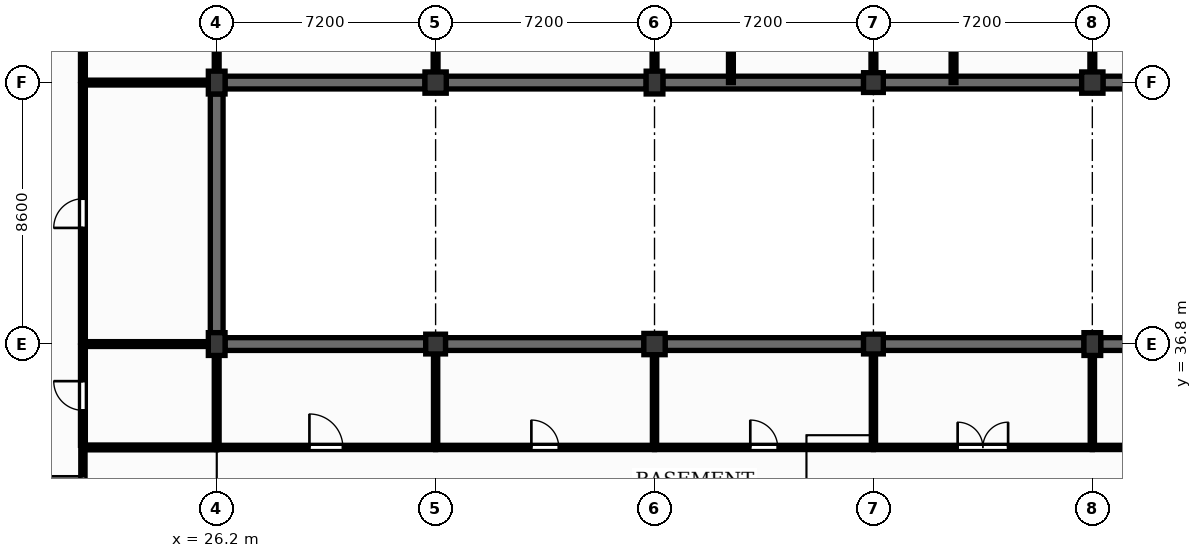
"""IFC4 building model, lengths in metres.
Left out: names, types, materials, properties, quantities, classifications, styles, units other than length and angle.
Written with IfcOpenShell. Run it as: python <this file> out.ifc"""

import sys

from ifc_helpers import new_model, si_unit, direction, frame, frame_2d, origin, origin_2d, place, context, subcontext, project, spatial, rectangle, extrude, element, fill, save


model = new_model("IFC4")
c1 = context("Model", 3, precision=1e-05, world=origin(), true_north=direction((0.0, 1.0)))
c2 = subcontext(c1, "Body", "Model", "MODEL_VIEW")
j1 = project(units=[si_unit("LENGTHUNIT", "METRE"), si_unit("PLANEANGLEUNIT", "RADIAN")], contexts=[c1])
p1 = place(None, origin())
s1 = spatial("IfcSite", under=j1, at=p1, CompositionType="ELEMENT")
p2 = place(p1, origin())
s2 = spatial("IfcBuilding", under=s1, at=p2, CompositionType="ELEMENT")
p3 = place(p2, frame((0.0, 0.0, -4.5)))
s3 = spatial("IfcBuildingStorey", under=s2, at=p3, CompositionType="ELEMENT", Elevation=-4.5)
for number, where, z_axis, x_axis in (
    (1, (26.2, 36.8, 0.0), (0.0, 0.0, 1.0), (1.0, 0.0, 0.0)),
    (2, (26.2, 45.4, 0.0), (0.0, 0.0, 1.0), (1.0, 0.0, 0.0)),
):
    element("IfcColumn", number, at=place(p3, frame(where, z_axis=z_axis, x_axis=x_axis)), inside=s3, PredefinedType="COLUMN", context=c2, shape_type="SweptSolid", body=[
        extrude(rectangle(XDim=0.55, YDim=0.75, at=origin_2d()), origin(), (0.0, 0.0, 1.0), 4.2),
    ])
p4 = place(p3, frame((33.4, 36.8, 0.0), z_axis=(0.0, 0.0, 1.0), x_axis=(1.0, 0.0, 0.0)))
e3 = element("IfcColumn", 3, at=p4, inside=s3, PredefinedType="COLUMN", context=c2, shape_type="SweptSolid", body=[
    extrude(rectangle(XDim=0.65, YDim=0.65, at=origin_2d()), origin(), (0.0, 0.0, 1.0), 4.2),
])
for number, where, z_axis, x_axis in (
    (4, (33.4, 45.4, 0.0), (0.0, 0.0, 1.0), (1.0, 0.0, 0.0)),
    (5, (40.6, 36.8, 0.0), (0.0, 0.0, 1.0), (1.0, 0.0, 0.0)),
):
    element("IfcColumn", number, at=place(p3, frame(where, z_axis=z_axis, x_axis=x_axis)), inside=s3, PredefinedType="COLUMN", context=c2, shape_type="SweptSolid", body=[
        extrude(rectangle(XDim=0.7, YDim=0.7, at=origin_2d()), origin(), (0.0, 0.0, 1.0), 4.2),
    ])
p5 = place(p3, frame((40.6, 45.4, 0.0), z_axis=(0.0, 0.0, 1.0), x_axis=(1.0, 0.0, 0.0)))
e6 = element("IfcColumn", 6, at=p5, inside=s3, PredefinedType="COLUMN", context=c2, shape_type="SweptSolid", body=[
    extrude(rectangle(XDim=0.55, YDim=0.75, at=origin_2d()), origin(), (0.0, 0.0, 1.0), 4.2),
])
for number, where, z_axis, x_axis in (
    (7, (47.8, 36.8, 0.0), (0.0, 0.0, 1.0), (1.0, 0.0, 0.0)),
    (8, (47.8, 45.4, 0.0), (0.0, 0.0, 1.0), (1.0, 0.0, 0.0)),
):
    element("IfcColumn", number, at=place(p3, frame(where, z_axis=z_axis, x_axis=x_axis)), inside=s3, PredefinedType="COLUMN", context=c2, shape_type="SweptSolid", body=[
        extrude(rectangle(XDim=0.65, YDim=0.65, at=origin_2d()), origin(), (0.0, 0.0, 1.0), 4.2),
    ])
p6 = place(p3, frame((55.0, 36.8, 0.0), z_axis=(0.0, 0.0, 1.0), x_axis=(1.0, 0.0, 0.0)))
e9 = element("IfcColumn", 9, at=p6, inside=s3, PredefinedType="COLUMN", context=c2, shape_type="SweptSolid", body=[
    extrude(rectangle(XDim=0.55, YDim=0.75, at=origin_2d()), origin(), (0.0, 0.0, 1.0), 4.2),
])
p7 = place(p3, frame((55.0, 45.4, 0.0), z_axis=(0.0, 0.0, 1.0), x_axis=(1.0, 0.0, 0.0)))
e10 = element("IfcColumn", 10, at=p7, inside=s3, PredefinedType="COLUMN", context=c2, shape_type="SweptSolid", body=[
    extrude(rectangle(XDim=0.7, YDim=0.7, at=origin_2d()), origin(), (0.0, 0.0, 1.0), 4.2),
])
p8 = place(p3, frame((26.2, 37.175, 0.0), z_axis=(0.0, 0.0, 1.0), x_axis=(0.0, 1.0, 0.0)))
e11 = element("IfcWall", 11, at=p8, inside=s3, PredefinedType="USERDEFINED", context=c2, shape_type="SweptSolid", body=[
    extrude(rectangle(XDim=7.85, YDim=0.42, at=frame_2d((3.925, 0.0))), origin(), (0.0, 0.0, 1.0), 4.2),
])
p9 = place(p3, frame((26.475, 36.8, 0.0), z_axis=(0.0, 0.0, 1.0), x_axis=(1.0, 0.0, 0.0)))
e12 = element("IfcWall", 12, at=p9, inside=s3, PredefinedType="USERDEFINED", context=c2, shape_type="SweptSolid", body=[
    extrude(rectangle(XDim=6.6, YDim=0.42, at=frame_2d((3.3, 0.0))), origin(), (0.0, 0.0, 1.0), 4.2),
])
p10 = place(p3, frame((26.475, 45.4, 0.0), z_axis=(0.0, 0.0, 1.0), x_axis=(1.0, 0.0, 0.0)))
e13 = element("IfcWall", 13, at=p10, inside=s3, PredefinedType="USERDEFINED", context=c2, shape_type="SweptSolid", body=[
    extrude(rectangle(XDim=6.575, YDim=0.42, at=frame_2d((3.288, 0.0))), origin(), (0.0, 0.0, 1.0), 4.2),
])
p11 = place(p3, frame((33.725, 36.8, 0.0), z_axis=(0.0, 0.0, 1.0), x_axis=(1.0, 0.0, 0.0)))
e14 = element("IfcWall", 14, at=p11, inside=s3, PredefinedType="USERDEFINED", context=c2, shape_type="SweptSolid", body=[
    extrude(rectangle(XDim=6.525, YDim=0.42, at=frame_2d((3.262, 0.0))), origin(), (0.0, 0.0, 1.0), 4.2),
])
p12 = place(p3, frame((33.75, 45.4, 0.0), z_axis=(0.0, 0.0, 1.0), x_axis=(1.0, 0.0, 0.0)))
e15 = element("IfcWall", 15, at=p12, inside=s3, PredefinedType="USERDEFINED", context=c2, shape_type="SweptSolid", body=[
    extrude(rectangle(XDim=6.575, YDim=0.42, at=frame_2d((3.288, 0.0))), origin(), (0.0, 0.0, 1.0), 4.2),
])
p13 = place(p3, frame((40.95, 36.8, 0.0), z_axis=(0.0, 0.0, 1.0), x_axis=(1.0, 0.0, 0.0)))
e16 = element("IfcWall", 16, at=p13, inside=s3, PredefinedType="USERDEFINED", context=c2, shape_type="SweptSolid", body=[
    extrude(rectangle(XDim=6.525, YDim=0.42, at=frame_2d((3.263, 0.0))), origin(), (0.0, 0.0, 1.0), 4.2),
])
for number, where, z_axis, x_axis in (
    (17, (40.875, 45.4, 0.0), (0.0, 0.0, 1.0), (1.0, 0.0, 0.0)),
    (18, (48.125, 36.8, 0.0), (0.0, 0.0, 1.0), (1.0, 0.0, 0.0)),
):
    element("IfcWall", number, at=place(p3, frame(where, z_axis=z_axis, x_axis=x_axis)), inside=s3, PredefinedType="USERDEFINED", context=c2, shape_type="SweptSolid", body=[
        extrude(rectangle(XDim=6.6, YDim=0.42, at=frame_2d((3.3, 0.0))), origin(), (0.0, 0.0, 1.0), 4.2),
    ])
p14 = place(p3, frame((48.125, 45.4, 0.0), z_axis=(0.0, 0.0, 1.0), x_axis=(1.0, 0.0, 0.0)))
e19 = element("IfcWall", 19, at=p14, inside=s3, PredefinedType="USERDEFINED", context=c2, shape_type="SweptSolid", body=[
    extrude(rectangle(XDim=6.525, YDim=0.42, at=frame_2d((3.262, 0.0))), origin(), (0.0, 0.0, 1.0), 4.2),
])
p15 = place(p3, frame((55.275, 36.8, 0.0), z_axis=(0.0, 0.0, 1.0), x_axis=(1.0, 0.0, 0.0)))
e20 = element("IfcWall", 20, at=p15, inside=s3, PredefinedType="USERDEFINED", context=c2, shape_type="SweptSolid", body=[
    extrude(rectangle(XDim=6.575, YDim=0.42, at=frame_2d((3.288, 0.0))), origin(), (0.0, 0.0, 1.0), 4.2),
])
p16 = place(p3, frame((55.35, 45.4, 0.0), z_axis=(0.0, 0.0, 1.0), x_axis=(1.0, 0.0, 0.0)))
e21 = element("IfcWall", 21, at=p16, inside=s3, PredefinedType="USERDEFINED", context=c2, shape_type="SweptSolid", body=[
    extrude(rectangle(XDim=6.525, YDim=0.42, at=frame_2d((3.262, 0.0))), origin(), (0.0, 0.0, 1.0), 4.2),
])
p17 = place(p3, frame((21.8, 30.47, 0.0), z_axis=(0.0, 0.0, 1.0), x_axis=(0.0, 1.0, 0.0)))
e22 = element("IfcWall", 22, at=p17, inside=s3, PredefinedType="PARTITIONING", context=c2, shape_type="SweptSolid", body=[
    extrude(rectangle(XDim=2.86, YDim=0.14, at=frame_2d((1.43, 0.0))), origin(), (0.0, 0.0, 1.0), 4.08),
])
p18 = place(p17, frame((0.88, 0.0, 0.0)))
e23 = element("IfcOpeningElement", 23, at=p18, cuts=e22, PredefinedType="OPENING", context=c2, shape_type="SweptSolid", body=[
    extrude(rectangle(XDim=1.1, YDim=2.1, at=frame_2d((0.55, 1.05))), frame((0.0, 0.08, 0.0), z_axis=(0.0, -1.0, 0.0), x_axis=(1.0, 0.0, 0.0)), (0.0, 0.0, 1.0), 0.16),
])
p19 = place(p3, frame((21.8, 33.47, 0.0), z_axis=(0.0, 0.0, 1.0), x_axis=(0.0, 1.0, 0.0)))
e24 = element("IfcWall", 24, at=p19, inside=s3, PredefinedType="PARTITIONING", context=c2, shape_type="SweptSolid", body=[
    extrude(rectangle(XDim=3.26, YDim=0.16, at=frame_2d((1.63, 0.0))), origin(), (0.0, 0.0, 1.0), 4.08),
])
p20 = place(p19, frame((1.15, 0.0, 0.0)))
e25 = element("IfcOpeningElement", 25, at=p20, cuts=e24, PredefinedType="OPENING", context=c2, shape_type="SweptSolid", body=[
    extrude(rectangle(XDim=0.96, YDim=2.1, at=frame_2d((0.48, 1.05))), frame((0.0, 0.09, 0.0), z_axis=(0.0, -1.0, 0.0), x_axis=(1.0, 0.0, 0.0)), (0.0, 0.0, 1.0), 0.18),
])
p21 = place(p3, frame((21.8, 33.4, 0.0), z_axis=(0.0, 0.0, 1.0), x_axis=(1.0, 0.0, 0.0)))
e26 = element("IfcWall", 26, at=p21, inside=s3, PredefinedType="PARTITIONING", context=c2, shape_type="SweptSolid", body=[
    extrude(rectangle(XDim=4.4, YDim=0.16, at=frame_2d((2.2, 0.0))), origin(), (0.0, 0.0, 1.0), 4.08),
])
p22 = place(p3, frame((21.8, 36.87, 0.0), z_axis=(0.0, 0.0, 1.0), x_axis=(0.0, 1.0, 0.0)))
e27 = element("IfcWall", 27, at=p22, inside=s3, PredefinedType="PARTITIONING", context=c2, shape_type="SweptSolid", body=[
    extrude(rectangle(XDim=8.46, YDim=0.16, at=frame_2d((4.23, 0.0))), origin(), (0.0, 0.0, 1.0), 4.08),
])
p23 = place(p22, frame((3.75, 0.0, 0.0)))
e28 = element("IfcOpeningElement", 28, at=p23, cuts=e27, PredefinedType="OPENING", context=c2, shape_type="SweptSolid", body=[
    extrude(rectangle(XDim=0.96, YDim=2.1, at=frame_2d((0.48, 1.05))), frame((0.0, 0.09, 0.0), z_axis=(0.0, -1.0, 0.0), x_axis=(1.0, 0.0, 0.0)), (0.0, 0.0, 1.0), 0.18),
])
p24 = place(p3, frame((21.8, 36.8, 0.0), z_axis=(0.0, 0.0, 1.0), x_axis=(1.0, 0.0, 0.0)))
e29 = element("IfcWall", 29, at=p24, inside=s3, PredefinedType="PARTITIONING", context=c2, shape_type="SweptSolid", body=[
    extrude(rectangle(XDim=4.125, YDim=0.16, at=frame_2d((2.062, 0.0))), origin(), (0.0, 0.0, 1.0), 3.5),
])
p25 = place(p3, frame((21.8, 45.47, 0.0), z_axis=(0.0, 0.0, 1.0), x_axis=(0.0, 1.0, 0.0)))
e30 = element("IfcWall", 30, at=p25, inside=s3, PredefinedType="PARTITIONING", context=c2, shape_type="SweptSolid", body=[
    extrude(rectangle(XDim=5.06, YDim=0.16, at=frame_2d((2.53, 0.0))), origin(), (0.0, 0.0, 1.0), 4.08),
])
p26 = place(p25, frame((2.05, 0.0, 0.0)))
e31 = element("IfcOpeningElement", 31, at=p26, cuts=e30, PredefinedType="OPENING", context=c2, shape_type="SweptSolid", body=[
    extrude(rectangle(XDim=0.96, YDim=2.1, at=frame_2d((0.48, 1.05))), frame((0.0, 0.09, 0.0), z_axis=(0.0, -1.0, 0.0), x_axis=(1.0, 0.0, 0.0)), (0.0, 0.0, 1.0), 0.18),
])
p27 = place(p3, frame((21.8, 45.4, 0.0), z_axis=(0.0, 0.0, 1.0), x_axis=(1.0, 0.0, 0.0)))
e32 = element("IfcWall", 32, at=p27, inside=s3, PredefinedType="PARTITIONING", context=c2, shape_type="SweptSolid", body=[
    extrude(rectangle(XDim=4.125, YDim=0.16, at=frame_2d((2.062, 0.0))), origin(), (0.0, 0.0, 1.0), 3.6),
])
p28 = place(p3, frame((26.2, 33.47, 0.0), z_axis=(0.0, 0.0, 1.0), x_axis=(0.0, 1.0, 0.0)))
e33 = element("IfcWall", 33, at=p28, inside=s3, PredefinedType="PARTITIONING", context=c2, shape_type="SweptSolid", body=[
    extrude(rectangle(XDim=2.955, YDim=0.16, at=frame_2d((1.478, 0.0))), origin(), (0.0, 0.0, 1.0), 3.4),
])
p29 = place(p3, frame((26.2, 33.4, 0.0), z_axis=(0.0, 0.0, 1.0), x_axis=(1.0, 0.0, 0.0)))
e34 = element("IfcWall", 34, at=p29, inside=s3, PredefinedType="PARTITIONING", context=c2, shape_type="SweptSolid", body=[
    extrude(rectangle(XDim=7.2, YDim=0.14, at=frame_2d((3.6, 0.0))), origin(), (0.0, 0.0, 1.0), 4.08),
])
p30 = place(p29, frame((3.05, 0.0, 0.0)))
e35 = element("IfcOpeningElement", 35, at=p30, cuts=e34, PredefinedType="OPENING", context=c2, shape_type="SweptSolid", body=[
    extrude(rectangle(XDim=1.1, YDim=2.1, at=frame_2d((0.55, 1.05))), frame((0.0, 0.08, 0.0), z_axis=(0.0, -1.0, 0.0), x_axis=(1.0, 0.0, 0.0)), (0.0, 0.0, 1.0), 0.16),
])
p31 = place(p3, frame((26.2, 45.775, 0.0), z_axis=(0.0, 0.0, 1.0), x_axis=(0.0, 1.0, 0.0)))
e36 = element("IfcWall", 36, at=p31, inside=s3, PredefinedType="PARTITIONING", context=c2, shape_type="SweptSolid", body=[
    extrude(rectangle(XDim=4.755, YDim=0.16, at=frame_2d((2.377, 0.0))), origin(), (0.0, 0.0, 1.0), 3.5),
])
p32 = place(p3, frame((33.4, 33.47, 0.0), z_axis=(0.0, 0.0, 1.0), x_axis=(0.0, 1.0, 0.0)))
e37 = element("IfcWall", 37, at=p32, inside=s3, PredefinedType="PARTITIONING", context=c2, shape_type="SweptSolid", body=[
    extrude(rectangle(XDim=3.005, YDim=0.14, at=frame_2d((1.502, 0.0))), origin(), (0.0, 0.0, 1.0), 3.4),
])
p33 = place(p3, frame((33.4, 33.4, 0.0), z_axis=(0.0, 0.0, 1.0), x_axis=(1.0, 0.0, 0.0)))
e38 = element("IfcWall", 38, at=p33, inside=s3, PredefinedType="PARTITIONING", context=c2, shape_type="SweptSolid", body=[
    extrude(rectangle(XDim=7.2, YDim=0.14, at=frame_2d((3.6, 0.0))), origin(), (0.0, 0.0, 1.0), 4.08),
])
p34 = place(p33, frame((3.15, 0.0, 0.0)))
e39 = element("IfcOpeningElement", 39, at=p34, cuts=e38, PredefinedType="OPENING", context=c2, shape_type="SweptSolid", body=[
    extrude(rectangle(XDim=0.9, YDim=2.1, at=frame_2d((0.45, 1.05))), frame((0.0, 0.08, 0.0), z_axis=(0.0, -1.0, 0.0), x_axis=(1.0, 0.0, 0.0)), (0.0, 0.0, 1.0), 0.16),
])
p35 = place(p3, frame((33.4, 45.75, 0.0), z_axis=(0.0, 0.0, 1.0), x_axis=(0.0, 1.0, 0.0)))
e40 = element("IfcWall", 40, at=p35, inside=s3, PredefinedType="PARTITIONING", context=c2, shape_type="SweptSolid", body=[
    extrude(rectangle(XDim=4.78, YDim=0.16, at=frame_2d((2.39, 0.0))), origin(), (0.0, 0.0, 1.0), 3.5),
])
p36 = place(p3, frame((40.6, 33.47, 0.0), z_axis=(0.0, 0.0, 1.0), x_axis=(0.0, 1.0, 0.0)))
e41 = element("IfcWall", 41, at=p36, inside=s3, PredefinedType="PARTITIONING", context=c2, shape_type="SweptSolid", body=[
    extrude(rectangle(XDim=2.98, YDim=0.14, at=frame_2d((1.49, 0.0))), origin(), (0.0, 0.0, 1.0), 3.4),
])
p37 = place(p3, frame((40.6, 33.4, 0.0), z_axis=(0.0, 0.0, 1.0), x_axis=(1.0, 0.0, 0.0)))
e42 = element("IfcWall", 42, at=p37, inside=s3, PredefinedType="PARTITIONING", context=c2, shape_type="SweptSolid", body=[
    extrude(rectangle(XDim=7.2, YDim=0.14, at=frame_2d((3.6, 0.0))), origin(), (0.0, 0.0, 1.0), 4.08),
])
p38 = place(p37, frame((3.15, 0.0, 0.0)))
e43 = element("IfcOpeningElement", 43, at=p38, cuts=e42, PredefinedType="OPENING", context=c2, shape_type="SweptSolid", body=[
    extrude(rectangle(XDim=0.9, YDim=2.1, at=frame_2d((0.45, 1.05))), frame((0.0, 0.08, 0.0), z_axis=(0.0, -1.0, 0.0), x_axis=(1.0, 0.0, 0.0)), (0.0, 0.0, 1.0), 0.16),
])
p39 = place(p3, frame((40.6, 45.775, 0.0), z_axis=(0.0, 0.0, 1.0), x_axis=(0.0, 1.0, 0.0)))
e44 = element("IfcWall", 44, at=p39, inside=s3, PredefinedType="PARTITIONING", context=c2, shape_type="SweptSolid", body=[
    extrude(rectangle(XDim=4.755, YDim=0.16, at=frame_2d((2.377, 0.0))), origin(), (0.0, 0.0, 1.0), 3.5),
])
p40 = place(p3, frame((43.113, 45.4, 0.0), z_axis=(0.0, 0.0, 1.0), x_axis=(0.0, 1.0, 0.0)))
e45 = element("IfcWall", 45, at=p40, inside=s3, PredefinedType="PARTITIONING", context=c2, shape_type="SweptSolid", body=[
    extrude(rectangle(XDim=5.13, YDim=0.16, at=frame_2d((2.565, 0.0))), origin(), (0.0, 0.0, 1.0), 4.08),
])
p41 = place(p3, frame((47.8, 33.47, 0.0), z_axis=(0.0, 0.0, 1.0), x_axis=(0.0, 1.0, 0.0)))
e46 = element("IfcWall", 46, at=p41, inside=s3, PredefinedType="PARTITIONING", context=c2, shape_type="SweptSolid", body=[
    extrude(rectangle(XDim=3.005, YDim=0.14, at=frame_2d((1.502, 0.0))), origin(), (0.0, 0.0, 1.0), 3.4),
])
p42 = place(p3, frame((47.8, 33.4, 0.0), z_axis=(0.0, 0.0, 1.0), x_axis=(1.0, 0.0, 0.0)))
e47 = element("IfcWall", 47, at=p42, inside=s3, PredefinedType="PARTITIONING", context=c2, shape_type="SweptSolid", body=[
    extrude(rectangle(XDim=7.2, YDim=0.14, at=frame_2d((3.6, 0.0))), origin(), (0.0, 0.0, 1.0), 4.08),
])
p43 = place(p42, frame((2.77, 0.0, 0.0)))
e48 = element("IfcOpeningElement", 48, at=p43, cuts=e47, PredefinedType="OPENING", context=c2, shape_type="SweptSolid", body=[
    extrude(rectangle(XDim=1.66, YDim=2.3, at=frame_2d((0.83, 1.15))), frame((0.0, 0.08, 0.0), z_axis=(0.0, -1.0, 0.0), x_axis=(1.0, 0.0, 0.0)), (0.0, 0.0, 1.0), 0.16),
])
p44 = place(p3, frame((47.8, 45.725, 0.0), z_axis=(0.0, 0.0, 1.0), x_axis=(0.0, 1.0, 0.0)))
e49 = element("IfcWall", 49, at=p44, inside=s3, PredefinedType="PARTITIONING", context=c2, shape_type="SweptSolid", body=[
    extrude(rectangle(XDim=4.805, YDim=0.16, at=frame_2d((2.402, 0.0))), origin(), (0.0, 0.0, 1.0), 3.5),
])
p45 = place(p3, frame((50.435, 45.4, 0.0), z_axis=(0.0, 0.0, 1.0), x_axis=(0.0, 1.0, 0.0)))
e50 = element("IfcWall", 50, at=p45, inside=s3, PredefinedType="PARTITIONING", context=c2, shape_type="SweptSolid", body=[
    extrude(rectangle(XDim=5.13, YDim=0.16, at=frame_2d((2.565, 0.0))), origin(), (0.0, 0.0, 1.0), 4.08),
])
p46 = place(p3, frame((55.0, 33.47, 0.0), z_axis=(0.0, 0.0, 1.0), x_axis=(0.0, 1.0, 0.0)))
e51 = element("IfcWall", 51, at=p46, inside=s3, PredefinedType="PARTITIONING", context=c2, shape_type="SweptSolid", body=[
    extrude(rectangle(XDim=2.955, YDim=0.14, at=frame_2d((1.478, 0.0))), origin(), (0.0, 0.0, 1.0), 3.4),
])
p47 = place(p3, frame((55.0, 33.4, 0.0), z_axis=(0.0, 0.0, 1.0), x_axis=(1.0, 0.0, 0.0)))
e52 = element("IfcWall", 52, at=p47, inside=s3, PredefinedType="PARTITIONING", context=c2, shape_type="SweptSolid", body=[
    extrude(rectangle(XDim=7.05, YDim=0.14, at=frame_2d((3.525, 0.0))), origin(), (0.0, 0.0, 1.0), 4.08),
])
p48 = place(p47, frame((2.885, 0.0, 0.0)))
e53 = element("IfcOpeningElement", 53, at=p48, cuts=e52, PredefinedType="OPENING", context=c2, shape_type="SweptSolid", body=[
    extrude(rectangle(XDim=1.28, YDim=2.2, at=frame_2d((0.64, 1.1))), frame((0.0, 0.08, 0.0), z_axis=(0.0, -1.0, 0.0), x_axis=(1.0, 0.0, 0.0)), (0.0, 0.0, 1.0), 0.16),
])
p49 = place(p3, frame((55.0, 45.75, 0.0), z_axis=(0.0, 0.0, 1.0), x_axis=(0.0, 1.0, 0.0)))
e54 = element("IfcWall", 54, at=p49, inside=s3, PredefinedType="PARTITIONING", context=c2, shape_type="SweptSolid", body=[
    extrude(rectangle(XDim=4.78, YDim=0.16, at=frame_2d((2.39, 0.0))), origin(), (0.0, 0.0, 1.0), 3.5),
])
p50 = place(p18, origin())
e55 = element("IfcDoor", 55, at=p50, inside=s3, OperationType="SINGLE_SWING_RIGHT", PredefinedType="DOOR", context=c2, shape_type="SweptSolid", body=[
    extrude(rectangle(XDim=1.1, YDim=2.1, at=frame_2d((0.55, 1.05))), frame((0.0, 0.025, 0.0), z_axis=(0.0, -1.0, 0.0), x_axis=(1.0, 0.0, 0.0)), (0.0, 0.0, 1.0), 0.05),
])
fill(e23, e55)
p51 = place(p30, origin())
e56 = element("IfcDoor", 56, at=p51, inside=s3, OperationType="SINGLE_SWING_LEFT", PredefinedType="DOOR", context=c2, shape_type="SweptSolid", body=[
    extrude(rectangle(XDim=1.1, YDim=2.1, at=frame_2d((0.55, 1.05))), frame((0.0, 0.025, 0.0), z_axis=(0.0, -1.0, 0.0), x_axis=(1.0, 0.0, 0.0)), (0.0, 0.0, 1.0), 0.05),
])
fill(e35, e56)
p52 = place(p34, origin())
e57 = element("IfcDoor", 57, at=p52, inside=s3, OperationType="SINGLE_SWING_LEFT", PredefinedType="DOOR", context=c2, shape_type="SweptSolid", body=[
    extrude(rectangle(XDim=0.9, YDim=2.1, at=frame_2d((0.45, 1.05))), frame((0.0, 0.025, 0.0), z_axis=(0.0, -1.0, 0.0), x_axis=(1.0, 0.0, 0.0)), (0.0, 0.0, 1.0), 0.05),
])
fill(e39, e57)
p53 = place(p38, origin())
e58 = element("IfcDoor", 58, at=p53, inside=s3, OperationType="SINGLE_SWING_LEFT", PredefinedType="DOOR", context=c2, shape_type="SweptSolid", body=[
    extrude(rectangle(XDim=0.9, YDim=2.1, at=frame_2d((0.45, 1.05))), frame((0.0, 0.025, 0.0), z_axis=(0.0, -1.0, 0.0), x_axis=(1.0, 0.0, 0.0)), (0.0, 0.0, 1.0), 0.05),
])
fill(e43, e58)
p54 = place(p43, origin())
e59 = element("IfcDoor", 59, at=p54, inside=s3, OperationType="DOUBLE_DOOR_SINGLE_SWING", PredefinedType="DOOR", context=c2, shape_type="SweptSolid", body=[
    extrude(rectangle(XDim=1.66, YDim=2.3, at=frame_2d((0.83, 1.15))), frame((0.0, 0.025, 0.0), z_axis=(0.0, -1.0, 0.0), x_axis=(1.0, 0.0, 0.0)), (0.0, 0.0, 1.0), 0.05),
])
fill(e48, e59)
p55 = place(p20, origin())
e60 = element("IfcDoor", 60, at=p55, inside=s3, OperationType="SINGLE_SWING_RIGHT", PredefinedType="DOOR", context=c2, shape_type="SweptSolid", body=[
    extrude(rectangle(XDim=0.96, YDim=2.1, at=frame_2d((0.48, 1.05))), frame((0.0, 0.025, 0.0), z_axis=(0.0, -1.0, 0.0), x_axis=(1.0, 0.0, 0.0)), (0.0, 0.0, 1.0), 0.05),
])
fill(e25, e60)
p56 = place(p23, origin())
e61 = element("IfcDoor", 61, at=p56, inside=s3, OperationType="SINGLE_SWING_LEFT", PredefinedType="DOOR", context=c2, shape_type="SweptSolid", body=[
    extrude(rectangle(XDim=0.96, YDim=2.1, at=frame_2d((0.48, 1.05))), frame((0.0, 0.025, 0.0), z_axis=(0.0, -1.0, 0.0), x_axis=(1.0, 0.0, 0.0)), (0.0, 0.0, 1.0), 0.05),
])
fill(e28, e61)
save(model, sys.argv[1])
